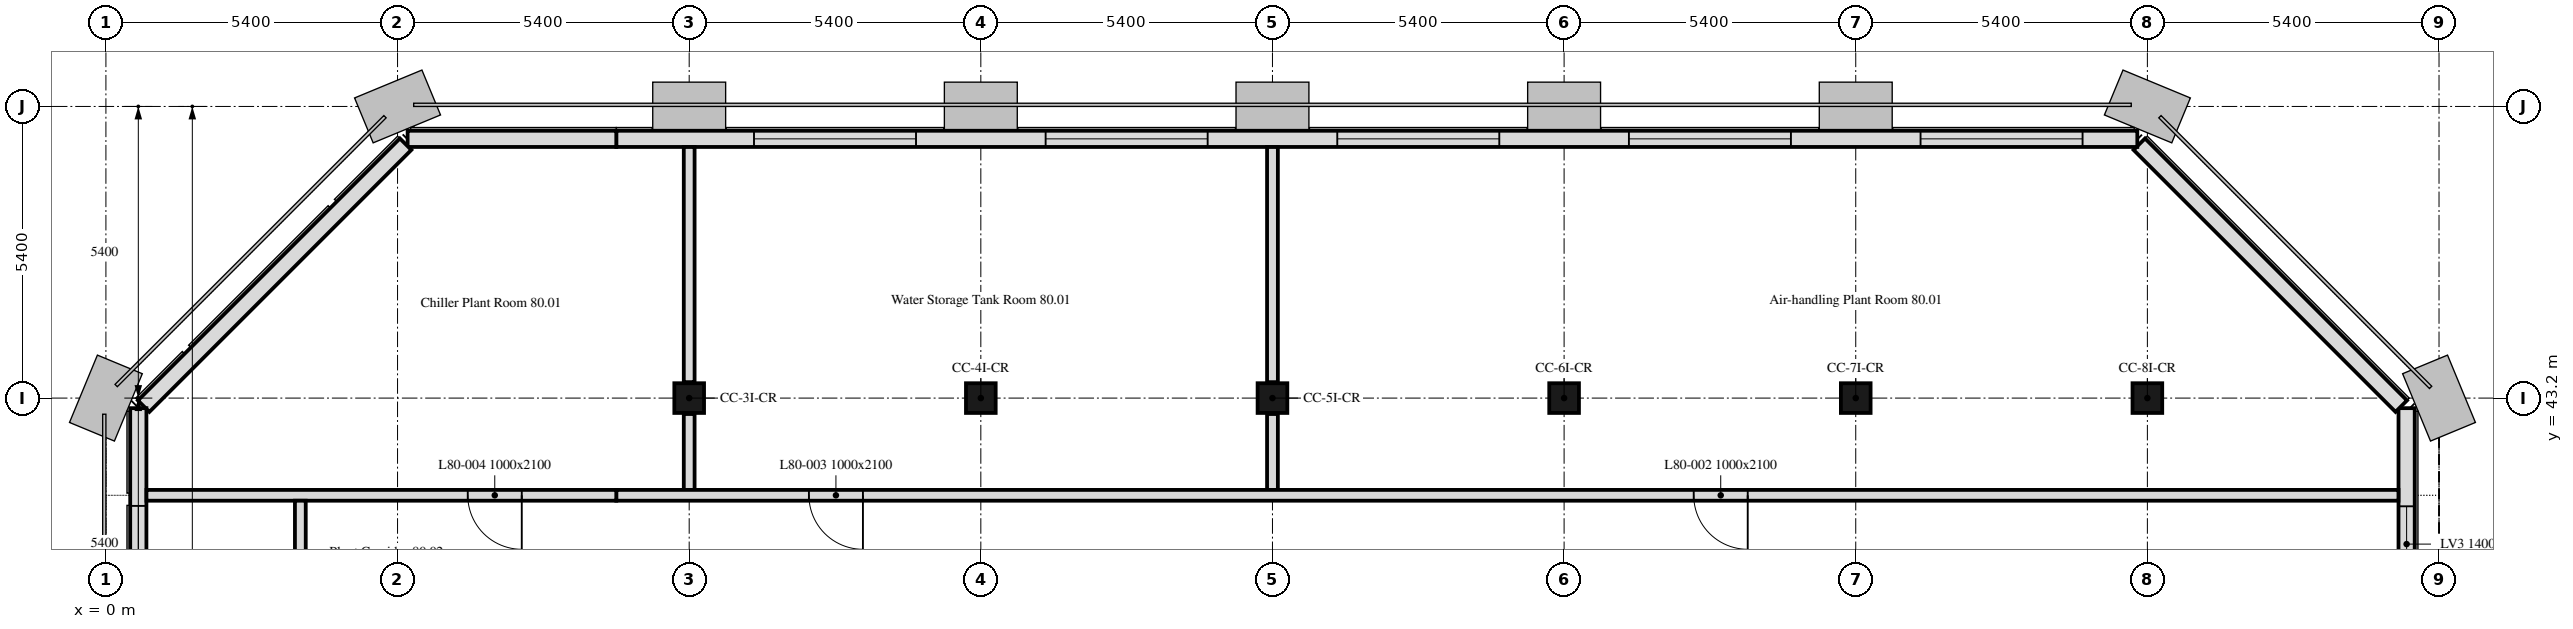
"""IFC4 building model, lengths in metres.
Left out: names, types, materials, properties, quantities, classifications, styles, units other than length and angle.
Written with IfcOpenShell. Run it as: python <this file> out.ifc"""

import sys

from ifc_helpers import new_model, si_unit, direction, frame, frame_2d, origin, origin_2d, place, context, subcontext, project, spatial, polyline, rectangle, outline, extrude, element, fill, save


model = new_model("IFC4")
c1 = context("Model", 3, precision=1e-05, world=origin(), true_north=direction((0.0, 1.0)))
c2 = subcontext(c1, "Body", "Model", "MODEL_VIEW")
j1 = project(units=[si_unit("LENGTHUNIT", "METRE"), si_unit("PLANEANGLEUNIT", "RADIAN")], contexts=[c1])
p1 = place(None, origin())
s1 = spatial("IfcSite", under=j1, at=p1, CompositionType="ELEMENT")
p2 = place(p1, origin())
s2 = spatial("IfcBuilding", under=s1, at=p2, CompositionType="ELEMENT")
p3 = place(p2, frame((0.0, 0.0, 321.7)))
s3 = spatial("IfcBuildingStorey", under=s2, at=p3, CompositionType="ELEMENT", Elevation=321.7)
for number, where, z_axis, x_axis in (
    (1, (10.8, 43.2, 0.0), (0.0, 0.0, 1.0), (1.0, 0.0, 0.0)),
    (2, (16.2, 43.2, 0.0), (0.0, 0.0, 1.0), (1.0, 0.0, 0.0)),
    (3, (21.6, 43.2, 0.0), (0.0, 0.0, 1.0), (1.0, 0.0, 0.0)),
    (4, (27.0, 43.2, 0.0), (0.0, 0.0, 1.0), (1.0, 0.0, 0.0)),
    (5, (32.4, 43.2, 0.0), (0.0, 0.0, 1.0), (1.0, 0.0, 0.0)),
    (6, (37.8, 43.2, 0.0), (0.0, 0.0, 1.0), (1.0, 0.0, 0.0)),
):
    element("IfcColumn", number, at=place(p3, frame(where, z_axis=z_axis, x_axis=x_axis)), inside=s3, PredefinedType="COLUMN", context=c2, shape_type="SweptSolid", body=[
        extrude(rectangle(XDim=0.55, YDim=0.55, at=origin_2d()), origin(), (0.0, 0.0, 1.0), 4.2),
    ])
p4 = place(p3, frame((42.6, 32.4, 0.0), z_axis=(0.0, 0.0, 1.0), x_axis=(0.0, 1.0, 0.0)))
e7 = element("IfcWall", 7, at=p4, inside=s3, PredefinedType="SOLIDWALL", context=c2, shape_type="SweptSolid", body=[
    extrude(outline(polyline([(0.0, 0.0), (10.614, 0.0), (10.614, 4.2), (10.024, 4.2), (9.434, 4.2), (8.845, 4.2), (8.255, 4.2), (7.665, 4.2), (7.076, 4.2), (6.486, 4.2), (5.896, 4.2), (5.307, 4.2), (4.717, 4.2), (4.127, 4.2), (3.538, 4.2), (2.948, 4.2), (2.359, 4.2), (1.769, 4.2), (1.179, 4.2), (0.59, 4.2), (0.0, 4.2), (0.0, 0.0)])), frame((0.0, 0.15, 0.0), z_axis=(0.0, -1.0, 0.0), x_axis=(1.0, 0.0, 0.0)), (0.0, 0.0, 1.0), 0.3),
])
p5 = place(p4, frame((1.2, 0.0, 0.6)))
e8 = element("IfcOpeningElement", 8, at=p5, cuts=e7, PredefinedType="OPENING", context=c2, shape_type="SweptSolid", body=[
    extrude(rectangle(XDim=3.0, YDim=1.8, at=frame_2d((1.5, 0.9))), frame((0.0, 0.16, 0.0), z_axis=(0.0, -1.0, 0.0), x_axis=(1.0, 0.0, 0.0)), (0.0, 0.0, 1.0), 0.32),
])
p6 = place(p4, frame((7.396, 0.0, 0.6)))
e9 = element("IfcOpeningElement", 9, at=p6, cuts=e7, PredefinedType="OPENING", context=c2, shape_type="SweptSolid", body=[
    extrude(rectangle(XDim=1.4, YDim=1.8, at=frame_2d((0.7, 0.9))), frame((0.0, 0.16, 0.0), z_axis=(0.0, -1.0, 0.0), x_axis=(1.0, 0.0, 0.0)), (0.0, 0.0, 1.0), 0.32),
])
p7 = place(p3, frame((42.501, 43.051, 0.0), z_axis=(0.0, 0.0, 1.0), x_axis=(-0.707106781187, 0.707106781187, 0.0)))
e10 = element("IfcWall", 10, at=p7, inside=s3, PredefinedType="SOLIDWALL", context=c2, shape_type="SweptSolid", body=[
    extrude(outline(polyline([(0.0, 0.0), (6.86, 0.0), (6.86, 4.2), (6.288, 4.2), (5.716, 4.2), (5.145, 4.2), (4.573, 4.2), (4.001, 4.2), (3.43, 4.2), (2.858, 4.2), (2.287, 4.2), (1.715, 4.2), (1.143, 4.2), (0.572, 4.2), (0.0, 4.2), (0.0, 0.0)])), frame((0.0, 0.15, 0.0), z_axis=(0.0, -1.0, 0.0), x_axis=(1.0, 0.0, 0.0)), (0.0, 0.0, 1.0), 0.3),
])
p8 = place(p3, frame((37.614, 48.0, 0.0), z_axis=(0.0, 0.0, 1.0), x_axis=(-1.0, 0.0, 0.0)))
e11 = element("IfcWall", 11, at=p8, inside=s3, PredefinedType="SOLIDWALL", context=c2, shape_type="SweptSolid", body=[
    extrude(outline(polyline([(0.0, 0.0), (28.164, 0.0), (28.164, 4.2), (27.564, 4.2), (26.965, 4.2), (26.366, 4.2), (25.767, 4.2), (25.167, 4.2), (24.568, 4.2), (23.969, 4.2), (23.37, 4.2), (22.771, 4.2), (22.171, 4.2), (21.572, 4.2), (20.973, 4.2), (20.374, 4.2), (19.774, 4.2), (19.175, 4.2), (18.576, 4.2), (17.977, 4.2), (17.377, 4.2), (16.778, 4.2), (16.179, 4.2), (15.58, 4.2), (14.981, 4.2), (14.381, 4.2), (13.782, 4.2), (13.183, 4.2), (12.584, 4.2), (11.985, 4.2), (11.385, 4.2), (10.786, 4.2), (10.187, 4.2), (9.588, 4.2), (8.988, 4.2), (8.389, 4.2), (7.79, 4.2), (7.191, 4.2), (6.592, 4.2), (5.992, 4.2), (5.393, 4.2), (4.794, 4.2), (4.195, 4.2), (3.595, 4.2), (2.996, 4.2), (2.397, 4.2), (1.798, 4.2), (1.198, 4.2), (0.599, 4.2), (0.0, 4.2), (0.0, 0.0)])), frame((0.0, 0.15, 0.0), z_axis=(0.0, -1.0, 0.0), x_axis=(1.0, 0.0, 0.0)), (0.0, 0.0, 1.0), 0.3),
])
p9 = place(p8, frame((1.014, 0.0, 0.6)))
e12 = element("IfcOpeningElement", 12, at=p9, cuts=e11, PredefinedType="OPENING", context=c2, shape_type="SweptSolid", body=[
    extrude(rectangle(XDim=3.0, YDim=1.8, at=frame_2d((1.5, 0.9))), frame((0.0, 0.16, 0.0), z_axis=(0.0, -1.0, 0.0), x_axis=(1.0, 0.0, 0.0)), (0.0, 0.0, 1.0), 0.32),
])
p10 = place(p8, frame((6.414, 0.0, 0.6)))
e13 = element("IfcOpeningElement", 13, at=p10, cuts=e11, PredefinedType="OPENING", context=c2, shape_type="SweptSolid", body=[
    extrude(rectangle(XDim=3.0, YDim=1.8, at=frame_2d((1.5, 0.9))), frame((0.0, 0.16, 0.0), z_axis=(0.0, -1.0, 0.0), x_axis=(1.0, 0.0, 0.0)), (0.0, 0.0, 1.0), 0.32),
])
p11 = place(p8, frame((11.814, 0.0, 0.6)))
e14 = element("IfcOpeningElement", 14, at=p11, cuts=e11, PredefinedType="OPENING", context=c2, shape_type="SweptSolid", body=[
    extrude(rectangle(XDim=3.0, YDim=1.8, at=frame_2d((1.5, 0.9))), frame((0.0, 0.16, 0.0), z_axis=(0.0, -1.0, 0.0), x_axis=(1.0, 0.0, 0.0)), (0.0, 0.0, 1.0), 0.32),
])
p12 = place(p8, frame((17.214, 0.0, 0.6)))
e15 = element("IfcOpeningElement", 15, at=p12, cuts=e11, PredefinedType="OPENING", context=c2, shape_type="SweptSolid", body=[
    extrude(rectangle(XDim=3.0, YDim=1.8, at=frame_2d((1.5, 0.9))), frame((0.0, 0.16, 0.0), z_axis=(0.0, -1.0, 0.0), x_axis=(1.0, 0.0, 0.0)), (0.0, 0.0, 1.0), 0.32),
])
p13 = place(p8, frame((22.614, 0.0, 0.6)))
e16 = element("IfcOpeningElement", 16, at=p13, cuts=e11, PredefinedType="OPENING", context=c2, shape_type="SweptSolid", body=[
    extrude(rectangle(XDim=3.0, YDim=1.8, at=frame_2d((1.5, 0.9))), frame((0.0, 0.16, 0.0), z_axis=(0.0, -1.0, 0.0), x_axis=(1.0, 0.0, 0.0)), (0.0, 0.0, 1.0), 0.32),
])
p14 = place(p3, frame((9.45, 48.0, 0.0), z_axis=(0.0, 0.0, 1.0), x_axis=(-1.0, 0.0, 0.0)))
e17 = element("IfcWall", 17, at=p14, inside=s3, PredefinedType="SOLIDWALL", context=c2, shape_type="SweptSolid", body=[
    extrude(outline(polyline([(0.0, 0.0), (3.864, 0.0), (3.864, 5.483), (3.312, 5.728), (2.76, 5.973), (2.208, 6.219), (1.656, 6.464), (1.104, 6.709), (0.552, 6.955), (0.0, 4.2), (0.0, 0.0)])), frame((0.0, 0.15, 0.0), z_axis=(0.0, -1.0, 0.0), x_axis=(1.0, 0.0, 0.0)), (0.0, 0.0, 1.0), 0.3),
])
p15 = place(p3, frame((5.55, 47.901, 0.0), z_axis=(0.0, 0.0, 1.0), x_axis=(-0.707106781187, -0.707106781187, 0.0)))
e18 = element("IfcWall", 18, at=p15, inside=s3, PredefinedType="SOLIDWALL", context=c2, shape_type="SweptSolid", body=[
    extrude(outline(polyline([(0.0, 0.0), (6.86, 0.0), (6.86, 3.311), (6.288, 3.49), (5.716, 3.67), (5.145, 3.85), (4.573, 4.029), (4.001, 4.209), (3.43, 4.389), (2.858, 4.568), (2.287, 4.748), (1.715, 4.927), (1.143, 5.107), (0.572, 5.287), (0.0, 5.467), (0.0, 0.0)])), frame((0.0, 0.15, 0.0), z_axis=(0.0, -1.0, 0.0), x_axis=(1.0, 0.0, 0.0)), (0.0, 0.0, 1.0), 0.3),
])
p16 = place(p3, frame((0.6, 43.014, 0.0), z_axis=(0.0, 0.0, 1.0), x_axis=(0.0, -1.0, 0.0)))
e19 = element("IfcWall", 19, at=p16, inside=s3, PredefinedType="SOLIDWALL", context=c2, shape_type="SweptSolid", body=[
    extrude(outline(polyline([(0.0, 0.0), (32.027, 0.0), (32.027, 3.267), (31.434, 3.267), (30.841, 3.267), (30.248, 3.267), (29.655, 3.267), (29.062, 3.267), (28.469, 3.267), (27.875, 3.267), (27.282, 3.267), (26.689, 3.267), (26.096, 3.267), (25.503, 3.267), (24.91, 3.267), (24.317, 3.267), (23.724, 3.267), (23.131, 3.267), (22.538, 3.267), (21.945, 3.267), (21.352, 3.267), (20.758, 3.267), (20.165, 3.267), (19.572, 3.267), (18.979, 3.267), (18.386, 3.267), (17.793, 3.267), (17.2, 3.267), (16.607, 3.267), (16.014, 3.267), (15.42, 3.267), (14.827, 3.267), (14.234, 3.267), (13.641, 3.267), (13.048, 3.267), (12.455, 3.267), (11.862, 3.267), (11.269, 3.267), (10.676, 3.267), (10.083, 3.267), (9.49, 3.267), (8.896, 3.267), (8.303, 3.267), (7.71, 3.267), (7.117, 3.267), (6.524, 3.267), (5.931, 3.267), (5.338, 3.267), (4.745, 3.267), (4.152, 3.267), (3.559, 3.267), (2.966, 3.267), (2.372, 3.267), (1.779, 3.267), (1.186, 3.267), (0.593, 3.267), (0.0, 3.267), (0.0, 0.0)])), frame((0.0, 0.15, 0.0), z_axis=(0.0, -1.0, 0.0), x_axis=(1.0, 0.0, 0.0)), (0.0, 0.0, 1.0), 0.3),
])
p17 = place(p16, frame((1.81, 0.0, 0.6)))
e20 = element("IfcOpeningElement", 20, at=p17, cuts=e19, PredefinedType="OPENING", context=c2, shape_type="SweptSolid", body=[
    extrude(rectangle(XDim=3.0, YDim=1.8, at=frame_2d((1.5, 0.9))), frame((0.0, 0.16, 0.0), z_axis=(0.0, -1.0, 0.0), x_axis=(1.0, 0.0, 0.0)), (0.0, 0.0, 1.0), 0.32),
])
p18 = place(p16, frame((6.414, 0.0, 0.6)))
e21 = element("IfcOpeningElement", 21, at=p18, cuts=e19, PredefinedType="OPENING", context=c2, shape_type="SweptSolid", body=[
    extrude(rectangle(XDim=3.0, YDim=1.8, at=frame_2d((1.5, 0.9))), frame((0.0, 0.16, 0.0), z_axis=(0.0, -1.0, 0.0), x_axis=(1.0, 0.0, 0.0)), (0.0, 0.0, 1.0), 0.32),
])
p19 = place(p16, frame((11.814, 0.0, 0.6)))
e22 = element("IfcOpeningElement", 22, at=p19, cuts=e19, PredefinedType="OPENING", context=c2, shape_type="SweptSolid", body=[
    extrude(rectangle(XDim=3.0, YDim=1.8, at=frame_2d((1.5, 0.9))), frame((0.0, 0.16, 0.0), z_axis=(0.0, -1.0, 0.0), x_axis=(1.0, 0.0, 0.0)), (0.0, 0.0, 1.0), 0.32),
])
p20 = place(p16, frame((17.214, 0.0, 0.6)))
e23 = element("IfcOpeningElement", 23, at=p20, cuts=e19, PredefinedType="OPENING", context=c2, shape_type="SweptSolid", body=[
    extrude(rectangle(XDim=3.0, YDim=1.8, at=frame_2d((1.5, 0.9))), frame((0.0, 0.16, 0.0), z_axis=(0.0, -1.0, 0.0), x_axis=(1.0, 0.0, 0.0)), (0.0, 0.0, 1.0), 0.32),
])
p21 = place(p16, frame((22.614, 0.0, 0.6)))
e24 = element("IfcOpeningElement", 24, at=p21, cuts=e19, PredefinedType="OPENING", context=c2, shape_type="SweptSolid", body=[
    extrude(rectangle(XDim=3.0, YDim=1.8, at=frame_2d((1.5, 0.9))), frame((0.0, 0.16, 0.0), z_axis=(0.0, -1.0, 0.0), x_axis=(1.0, 0.0, 0.0)), (0.0, 0.0, 1.0), 0.32),
])
p22 = place(p16, frame((28.014, 0.0, 0.6)))
e25 = element("IfcOpeningElement", 25, at=p22, cuts=e19, PredefinedType="OPENING", context=c2, shape_type="SweptSolid", body=[
    extrude(rectangle(XDim=3.0, YDim=1.8, at=frame_2d((1.5, 0.9))), frame((0.0, 0.16, 0.0), z_axis=(0.0, -1.0, 0.0), x_axis=(1.0, 0.0, 0.0)), (0.0, 0.0, 1.0), 0.32),
])
p23 = place(p3, frame((21.6, 47.849, 0.0), z_axis=(0.0, 0.0, 1.0), x_axis=(0.0, -1.0, 0.0)))
e26 = element("IfcWall", 26, at=p23, inside=s3, PredefinedType="PARTITIONING", context=c2, shape_type="SweptSolid", body=[
    extrude(rectangle(XDim=4.354, YDim=0.2, at=frame_2d((2.177, 0.0))), origin(), (0.0, 0.0, 1.0), 3.45),
])
p24 = place(p3, frame((21.6, 42.905, 0.0), z_axis=(0.0, 0.0, 1.0), x_axis=(0.0, -1.0, 0.0)))
e27 = element("IfcWall", 27, at=p24, inside=s3, PredefinedType="PARTITIONING", context=c2, shape_type="SweptSolid", body=[
    extrude(rectangle(XDim=1.405, YDim=0.2, at=frame_2d((0.703, 0.0))), origin(), (0.0, 0.0, 1.0), 3.45),
])
p25 = place(p3, frame((10.8, 47.849, 0.0), z_axis=(0.0, 0.0, 1.0), x_axis=(0.0, -1.0, 0.0)))
e28 = element("IfcWall", 28, at=p25, inside=s3, PredefinedType="PARTITIONING", context=c2, shape_type="SweptSolid", body=[
    extrude(rectangle(XDim=4.354, YDim=0.2, at=frame_2d((2.177, 0.0))), origin(), (0.0, 0.0, 1.0), 3.45),
])
p26 = place(p3, frame((10.8, 42.905, 0.0), z_axis=(0.0, 0.0, 1.0), x_axis=(0.0, -1.0, 0.0)))
e29 = element("IfcWall", 29, at=p26, inside=s3, PredefinedType="PARTITIONING", context=c2, shape_type="SweptSolid", body=[
    extrude(rectangle(XDim=1.405, YDim=0.2, at=frame_2d((0.703, 0.0))), origin(), (0.0, 0.0, 1.0), 3.45),
])
p27 = place(p3, frame((42.449, 41.4, 0.0), z_axis=(0.0, 0.0, 1.0), x_axis=(-1.0, 0.0, 0.0)))
e30 = element("IfcWall", 30, at=p27, inside=s3, PredefinedType="PARTITIONING", context=c2, shape_type="SweptSolid", body=[
    extrude(rectangle(XDim=32.999, YDim=0.2, at=frame_2d((16.5, 0.0))), origin(), (0.0, 0.0, 1.0), 3.45),
])
p28 = place(p27, frame((12.049, 0.0, 0.0)))
e31 = element("IfcOpeningElement", 31, at=p28, cuts=e30, PredefinedType="OPENING", context=c2, shape_type="SweptSolid", body=[
    extrude(rectangle(XDim=1.0, YDim=2.1, at=frame_2d((0.5, 1.05))), frame((0.0, 0.1, 0.0), z_axis=(0.0, -1.0, 0.0), x_axis=(1.0, 0.0, 0.0)), (0.0, 0.0, 1.0), 0.2),
])
p29 = place(p27, frame((28.432, 0.0, 0.0)))
e32 = element("IfcOpeningElement", 32, at=p29, cuts=e30, PredefinedType="OPENING", context=c2, shape_type="SweptSolid", body=[
    extrude(rectangle(XDim=1.0, YDim=2.1, at=frame_2d((0.5, 1.05))), frame((0.0, 0.1, 0.0), z_axis=(0.0, -1.0, 0.0), x_axis=(1.0, 0.0, 0.0)), (0.0, 0.0, 1.0), 0.2),
])
p30 = place(p3, frame((9.45, 41.4, 0.0), z_axis=(0.0, 0.0, 1.0), x_axis=(-1.0, 0.0, 0.0)))
e33 = element("IfcWall", 33, at=p30, inside=s3, PredefinedType="PARTITIONING", context=c2, shape_type="SweptSolid", body=[
    extrude(outline(polyline([(0.0, 0.0), (8.699, 0.0), (8.699, 3.334), (0.0, 4.2), (0.0, 0.0)])), frame((0.0, 0.1, 0.0), z_axis=(0.0, -1.0, 0.0), x_axis=(1.0, 0.0, 0.0)), (0.0, 0.0, 1.0), 0.2),
])
p31 = place(p30, frame((1.75, 0.0, 0.0)))
e34 = element("IfcOpeningElement", 34, at=p31, cuts=e33, PredefinedType="OPENING", context=c2, shape_type="SweptSolid", body=[
    extrude(rectangle(XDim=1.0, YDim=2.1, at=frame_2d((0.5, 1.05))), frame((0.0, 0.1, 0.0), z_axis=(0.0, -1.0, 0.0), x_axis=(1.0, 0.0, 0.0)), (0.0, 0.0, 1.0), 0.2),
])
p32 = place(p3, frame((3.6, 11.35, 0.0), z_axis=(0.0, 0.0, 1.0), x_axis=(0.0, 1.0, 0.0)))
e35 = element("IfcWall", 35, at=p32, inside=s3, PredefinedType="PARTITIONING", context=c2, shape_type="SweptSolid", body=[
    extrude(rectangle(XDim=29.95, YDim=0.2, at=frame_2d((14.975, 0.0))), origin(), (0.0, 0.0, 1.0), 4.6),
])
p33 = place(p32, frame((23.508, 0.0, 0.0)))
e36 = element("IfcOpeningElement", 36, at=p33, cuts=e35, PredefinedType="OPENING", context=c2, shape_type="SweptSolid", body=[
    extrude(rectangle(XDim=1.0, YDim=2.1, at=frame_2d((0.5, 1.05))), frame((0.0, 0.1, 0.0), z_axis=(0.0, -1.0, 0.0), x_axis=(1.0, 0.0, 0.0)), (0.0, 0.0, 1.0), 0.2),
])
p34 = place(p32, frame((17.85, 0.0, 0.0)))
e37 = element("IfcOpeningElement", 37, at=p34, cuts=e35, PredefinedType="OPENING", context=c2, shape_type="SweptSolid", body=[
    extrude(rectangle(XDim=1.0, YDim=2.1, at=frame_2d((0.5, 1.05))), frame((0.0, 0.1, 0.0), z_axis=(0.0, -1.0, 0.0), x_axis=(1.0, 0.0, 0.0)), (0.0, 0.0, 1.0), 0.2),
])
p35 = place(p32, frame((1.875, 0.0, 0.0)))
e38 = element("IfcOpeningElement", 38, at=p35, cuts=e35, PredefinedType="OPENING", context=c2, shape_type="SweptSolid", body=[
    extrude(rectangle(XDim=1.0, YDim=2.1, at=frame_2d((0.5, 1.05))), frame((0.0, 0.1, 0.0), z_axis=(0.0, -1.0, 0.0), x_axis=(1.0, 0.0, 0.0)), (0.0, 0.0, 1.0), 0.2),
])
p36 = place(p32, frame((9.75, 0.0, 0.0)))
e39 = element("IfcOpeningElement", 39, at=p36, cuts=e35, PredefinedType="OPENING", context=c2, shape_type="SweptSolid", body=[
    extrude(rectangle(XDim=1.0, YDim=2.1, at=frame_2d((0.5, 1.05))), frame((0.0, 0.1, 0.0), z_axis=(0.0, -1.0, 0.0), x_axis=(1.0, 0.0, 0.0)), (0.0, 0.0, 1.0), 0.2),
])
p37 = place(p6, origin())
e40 = element("IfcWindow", 40, at=p37, inside=s3, PartitioningType="SINGLE_PANEL", PredefinedType="WINDOW", context=c2, shape_type="SweptSolid", body=[
    extrude(rectangle(XDim=1.4, YDim=1.8, at=frame_2d((0.7, 0.9))), frame((0.0, 0.03, 0.0), z_axis=(0.0, -1.0, 0.0), x_axis=(1.0, 0.0, 0.0)), (0.0, 0.0, 1.0), 0.06),
])
fill(e9, e40)
p38 = place(p9, origin())
e41 = element("IfcWindow", 41, at=p38, inside=s3, PartitioningType="SINGLE_PANEL", PredefinedType="WINDOW", context=c2, shape_type="SweptSolid", body=[
    extrude(rectangle(XDim=3.0, YDim=1.8, at=frame_2d((1.5, 0.9))), frame((0.0, 0.03, 0.0), z_axis=(0.0, -1.0, 0.0), x_axis=(1.0, 0.0, 0.0)), (0.0, 0.0, 1.0), 0.06),
])
fill(e12, e41)
p39 = place(p10, origin())
e42 = element("IfcWindow", 42, at=p39, inside=s3, PartitioningType="SINGLE_PANEL", PredefinedType="WINDOW", context=c2, shape_type="SweptSolid", body=[
    extrude(rectangle(XDim=3.0, YDim=1.8, at=frame_2d((1.5, 0.9))), frame((0.0, 0.03, 0.0), z_axis=(0.0, -1.0, 0.0), x_axis=(1.0, 0.0, 0.0)), (0.0, 0.0, 1.0), 0.06),
])
fill(e13, e42)
p40 = place(p11, origin())
e43 = element("IfcWindow", 43, at=p40, inside=s3, PartitioningType="SINGLE_PANEL", PredefinedType="WINDOW", context=c2, shape_type="SweptSolid", body=[
    extrude(rectangle(XDim=3.0, YDim=1.8, at=frame_2d((1.5, 0.9))), frame((0.0, 0.03, 0.0), z_axis=(0.0, -1.0, 0.0), x_axis=(1.0, 0.0, 0.0)), (0.0, 0.0, 1.0), 0.06),
])
fill(e14, e43)
p41 = place(p12, origin())
e44 = element("IfcWindow", 44, at=p41, inside=s3, PartitioningType="SINGLE_PANEL", PredefinedType="WINDOW", context=c2, shape_type="SweptSolid", body=[
    extrude(rectangle(XDim=3.0, YDim=1.8, at=frame_2d((1.5, 0.9))), frame((0.0, 0.03, 0.0), z_axis=(0.0, -1.0, 0.0), x_axis=(1.0, 0.0, 0.0)), (0.0, 0.0, 1.0), 0.06),
])
fill(e15, e44)
p42 = place(p13, origin())
e45 = element("IfcWindow", 45, at=p42, inside=s3, PartitioningType="SINGLE_PANEL", PredefinedType="WINDOW", context=c2, shape_type="SweptSolid", body=[
    extrude(rectangle(XDim=3.0, YDim=1.8, at=frame_2d((1.5, 0.9))), frame((0.0, 0.03, 0.0), z_axis=(0.0, -1.0, 0.0), x_axis=(1.0, 0.0, 0.0)), (0.0, 0.0, 1.0), 0.06),
])
fill(e16, e45)
p43 = place(p17, origin())
e46 = element("IfcWindow", 46, at=p43, inside=s3, PartitioningType="SINGLE_PANEL", PredefinedType="WINDOW", context=c2, shape_type="SweptSolid", body=[
    extrude(rectangle(XDim=3.0, YDim=1.8, at=frame_2d((1.5, 0.9))), frame((0.0, 0.03, 0.0), z_axis=(0.0, -1.0, 0.0), x_axis=(1.0, 0.0, 0.0)), (0.0, 0.0, 1.0), 0.06),
])
fill(e20, e46)
p44 = place(p28, origin())
e47 = element("IfcDoor", 47, at=p44, inside=s3, OperationType="SINGLE_SWING_RIGHT", PredefinedType="DOOR", context=c2, shape_type="SweptSolid", body=[
    extrude(rectangle(XDim=1.0, YDim=2.1, at=frame_2d((0.5, 1.05))), frame((0.0, 0.025, 0.0), z_axis=(0.0, -1.0, 0.0), x_axis=(1.0, 0.0, 0.0)), (0.0, 0.0, 1.0), 0.05),
])
fill(e31, e47)
p45 = place(p29, origin())
e48 = element("IfcDoor", 48, at=p45, inside=s3, OperationType="SINGLE_SWING_LEFT", PredefinedType="DOOR", context=c2, shape_type="SweptSolid", body=[
    extrude(rectangle(XDim=1.0, YDim=2.1, at=frame_2d((0.5, 1.05))), frame((0.0, 0.025, 0.0), z_axis=(0.0, -1.0, 0.0), x_axis=(1.0, 0.0, 0.0)), (0.0, 0.0, 1.0), 0.05),
])
fill(e32, e48)
p46 = place(p31, origin())
e49 = element("IfcDoor", 49, at=p46, inside=s3, OperationType="SINGLE_SWING_LEFT", PredefinedType="DOOR", context=c2, shape_type="SweptSolid", body=[
    extrude(rectangle(XDim=1.0, YDim=2.1, at=frame_2d((0.5, 1.05))), frame((0.0, 0.025, 0.0), z_axis=(0.0, -1.0, 0.0), x_axis=(1.0, 0.0, 0.0)), (0.0, 0.0, 1.0), 0.05),
])
fill(e34, e49)
save(model, sys.argv[1])
